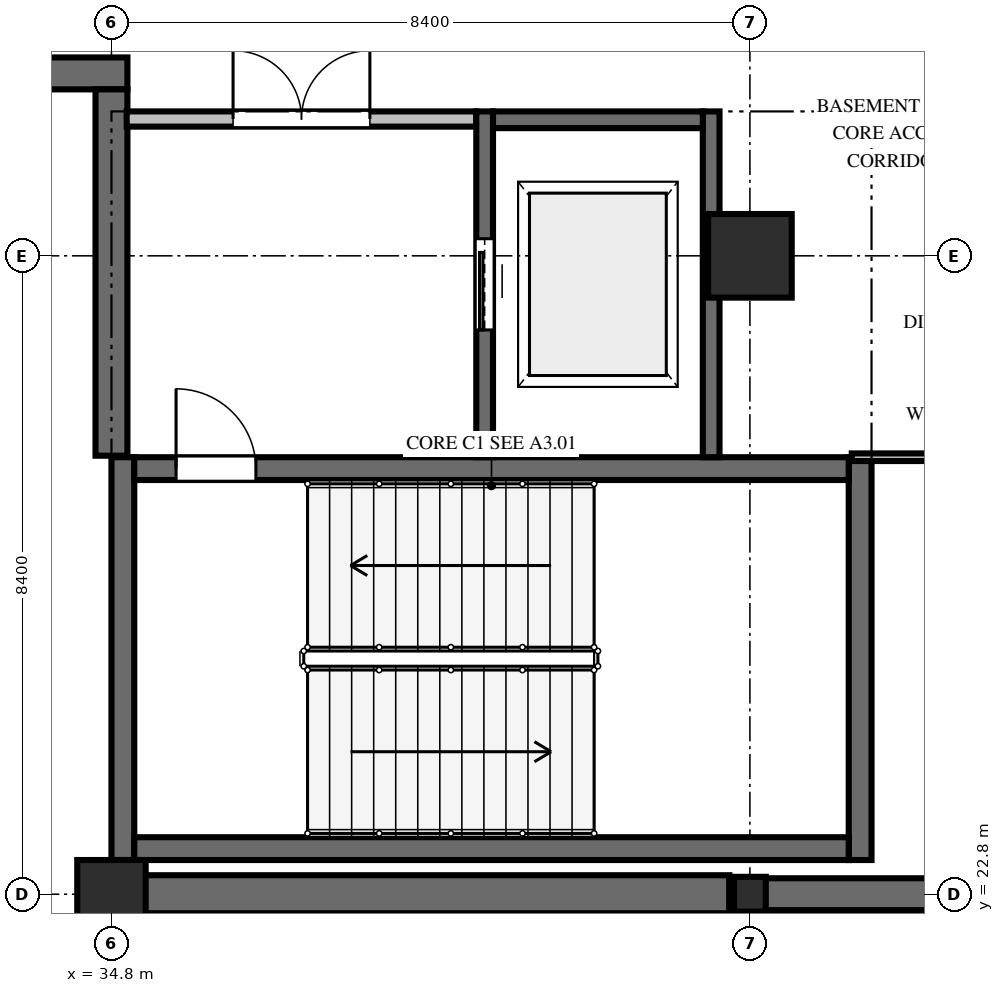
"""IFC4 building model, lengths in metres.
Left out: names, types, materials, properties, quantities, classifications, styles, units other than length and angle.
Written with IfcOpenShell. Run it as: python <this file> out.ifc"""

import sys

from ifc_helpers import new_model, si_unit, direction, frame, frame_2d, origin, origin_2d, place, context, subcontext, project, spatial, rectangle, hollow_rectangle, i_section, extrude, element, fill, save


model = new_model("IFC4")
c1 = context("Model", 3, precision=1e-05, world=origin(), true_north=direction((0.0, 1.0)))
c2 = subcontext(c1, "Body", "Model", "MODEL_VIEW")
j1 = project(units=[si_unit("LENGTHUNIT", "METRE"), si_unit("PLANEANGLEUNIT", "RADIAN")], contexts=[c1])
p1 = place(None, origin())
s1 = spatial("IfcSite", under=j1, at=p1, CompositionType="ELEMENT")
p2 = place(p1, origin())
s2 = spatial("IfcBuilding", under=s1, at=p2, CompositionType="ELEMENT")
p3 = place(p2, frame((0.0, 0.0, -4.8)))
s3 = spatial("IfcBuildingStorey", under=s2, at=p3, CompositionType="ELEMENT", Elevation=-4.8)
p4 = place(p3, frame((34.8, 22.8, 0.0), z_axis=(0.0, 0.0, 1.0), x_axis=(1.0, 0.0, 0.0)))
e1 = element("IfcColumn", 1, at=p4, inside=s3, PredefinedType="COLUMN", context=c2, shape_type="SweptSolid", body=[
    extrude(hollow_rectangle(XDim=0.9, YDim=0.9, WallThickness=0.036, InnerFilletRadius=0.036, OuterFilletRadius=0.072, at=origin_2d()), origin(), (0.0, 0.0, 1.0), 4.8),
])
p5 = place(p3, frame((43.2, 22.8, 0.0), z_axis=(0.0, 0.0, 1.0), x_axis=(1.0, 0.0, 0.0)))
e2 = element("IfcColumn", 2, at=p5, inside=s3, PredefinedType="COLUMN", context=c2, shape_type="SweptSolid", body=[
    extrude(i_section(OverallWidth=0.417, OverallDepth=0.458, WebThickness=0.03, FlangeThickness=0.04, FilletRadius=0.022, at=origin_2d()), origin(), (0.0, 0.0, 1.0), 4.8),
])
p6 = place(p3, frame((43.2, 31.2, 0.0), z_axis=(0.0, 0.0, 1.0), x_axis=(1.0, 0.0, 0.0)))
e3 = element("IfcColumn", 3, at=p6, inside=s3, PredefinedType="COLUMN", context=c2, shape_type="SweptSolid", body=[
    extrude(rectangle(XDim=1.1, YDim=1.1, at=origin_2d()), origin(), (0.0, 0.0, 1.0), 4.8),
])
p7 = place(p3, frame((24.3, 33.6, 0.0), z_axis=(0.0, 0.0, 1.0), x_axis=(1.0, 0.0, 0.0)))
e4 = element("IfcWall", 4, at=p7, inside=s3, PredefinedType="USERDEFINED", context=c2, shape_type="SweptSolid", body=[
    extrude(rectangle(XDim=10.71, YDim=0.42, at=frame_2d((5.355, 0.0))), origin(), (0.0, 0.0, 1.0), 4.32),
])
p8 = place(p3, frame((34.8, 33.39, 0.0), z_axis=(0.0, 0.0, 1.0), x_axis=(0.0, -1.0, 0.0)))
e5 = element("IfcWall", 5, at=p8, inside=s3, PredefinedType="USERDEFINED", context=c2, shape_type="SweptSolid", body=[
    extrude(rectangle(XDim=4.82, YDim=0.42, at=frame_2d((2.41, 0.0))), origin(), (0.0, 0.0, 1.0), 4.32),
])
p9 = place(p3, frame((34.55, 22.8, 0.0), z_axis=(0.0, 0.0, 1.0), x_axis=(1.0, 0.0, 0.0)))
e6 = element("IfcWall", 6, at=p9, inside=s3, PredefinedType="USERDEFINED", context=c2, shape_type="SweptSolid", body=[
    extrude(rectangle(XDim=8.38, YDim=0.5, at=frame_2d((4.19, 0.0))), origin(), (0.0, 0.0, 1.0), 4.32),
])
p10 = place(p3, frame((42.93, 22.8, 0.0), z_axis=(0.0, 0.0, 1.0), x_axis=(1.0, 0.0, 0.0)))
e7 = element("IfcWall", 7, at=p10, inside=s3, PredefinedType="USERDEFINED", context=c2, shape_type="SweptSolid", body=[
    extrude(rectangle(XDim=8.13, YDim=0.42, at=frame_2d((4.065, 0.0))), origin(), (0.0, 0.0, 1.0), 4.32),
])
for number, where, z_axis, x_axis in (
    (8, (34.95, 23.25, 0.0), (0.0, 0.0, 1.0), (0.0, 1.0, 0.0)),
    (9, (44.65, 28.55, 0.0), (0.0, 0.0, 1.0), (0.0, -1.0, 0.0)),
):
    element("IfcWall", number, at=place(p3, frame(where, z_axis=z_axis, x_axis=x_axis)), inside=s3, PredefinedType="SHEAR", context=c2, shape_type="SweptSolid", body=[
        extrude(rectangle(XDim=5.3, YDim=0.3, at=frame_2d((2.65, 0.0))), origin(), (0.0, 0.0, 1.0), 4.51),
    ])
p11 = place(p3, frame((44.5, 23.4, 0.0), z_axis=(0.0, 0.0, 1.0), x_axis=(-1.0, 0.0, 0.0)))
e10 = element("IfcWall", 10, at=p11, inside=s3, PredefinedType="SHEAR", context=c2, shape_type="SweptSolid", body=[
    extrude(rectangle(XDim=9.4, YDim=0.3, at=frame_2d((4.7, 0.0))), origin(), (0.0, 0.0, 1.0), 4.51),
])
p12 = place(p3, frame((35.1, 28.4, 0.0), z_axis=(0.0, 0.0, 1.0), x_axis=(1.0, 0.0, 0.0)))
e11 = element("IfcWall", 11, at=p12, inside=s3, PredefinedType="SHEAR", context=c2, shape_type="SweptSolid", body=[
    extrude(rectangle(XDim=9.4, YDim=0.3, at=frame_2d((4.7, 0.0))), origin(), (0.0, 0.0, 1.0), 4.51),
])
p13 = place(p12, frame((0.55, 0.0, 0.0)))
e12 = element("IfcOpeningElement", 12, at=p13, cuts=e11, PredefinedType="OPENING", context=c2, shape_type="SweptSolid", body=[
    extrude(rectangle(XDim=1.05, YDim=2.2, at=frame_2d((0.525, 1.1))), frame((0.0, 0.16, 0.0), z_axis=(0.0, -1.0, 0.0), x_axis=(1.0, 0.0, 0.0)), (0.0, 0.0, 1.0), 0.32),
])
p14 = place(p3, frame((35.0, 33.0, 0.0), z_axis=(0.0, 0.0, 1.0), x_axis=(1.0, 0.0, 0.0)))
e13 = element("IfcWall", 13, at=p14, inside=s3, PredefinedType="SOLIDWALL", context=c2, shape_type="SweptSolid", body=[
    extrude(rectangle(XDim=4.6, YDim=0.2, at=frame_2d((2.3, 0.0))), origin(), (0.0, 0.0, 1.0), 4.45),
])
p15 = place(p14, frame((1.4, 0.0, 0.0)))
e14 = element("IfcOpeningElement", 14, at=p15, cuts=e13, PredefinedType="OPENING", context=c2, shape_type="SweptSolid", body=[
    extrude(rectangle(XDim=1.8, YDim=2.2, at=frame_2d((0.9, 1.1))), frame((0.0, 0.11, 0.0), z_axis=(0.0, -1.0, 0.0), x_axis=(1.0, 0.0, 0.0)), (0.0, 0.0, 1.0), 0.22),
])
p16 = place(p3, frame((39.71, 28.55, 0.0), z_axis=(0.0, 0.0, 1.0), x_axis=(0.0, 1.0, 0.0)))
e15 = element("IfcWall", 15, at=p16, inside=s3, PredefinedType="SOLIDWALL", context=c2, shape_type="SweptSolid", body=[
    extrude(rectangle(XDim=4.55, YDim=0.22, at=frame_2d((2.275, 0.0))), origin(), (0.0, 0.0, 1.0), 4.51),
])
p17 = place(p16, frame((1.675, 0.0, 0.0)))
e16 = element("IfcOpeningElement", 16, at=p17, cuts=e15, PredefinedType="OPENING", context=c2, shape_type="SweptSolid", body=[
    extrude(rectangle(XDim=1.2, YDim=2.2, at=frame_2d((0.6, 1.1))), frame((0.0, 0.12, 0.0), z_axis=(0.0, -1.0, 0.0), x_axis=(1.0, 0.0, 0.0)), (0.0, 0.0, 1.0), 0.24),
])
p18 = place(p3, frame((42.69, 28.55, 0.0), z_axis=(0.0, 0.0, 1.0), x_axis=(0.0, 1.0, 0.0)))
e17 = element("IfcWall", 17, at=p18, inside=s3, PredefinedType="SOLIDWALL", context=c2, shape_type="SweptSolid", body=[
    extrude(rectangle(XDim=4.55, YDim=0.22, at=frame_2d((2.275, 0.0))), origin(), (0.0, 0.0, 1.0), 4.51),
])
p19 = place(p3, frame((39.82, 32.99, 0.0), z_axis=(0.0, 0.0, 1.0), x_axis=(1.0, 0.0, 0.0)))
e18 = element("IfcWall", 18, at=p19, inside=s3, PredefinedType="SOLIDWALL", context=c2, shape_type="SweptSolid", body=[
    extrude(rectangle(XDim=2.76, YDim=0.22, at=frame_2d((1.38, 0.0))), origin(), (0.0, 0.0, 1.0), 4.51),
])
p20 = place(p3, frame((46.68, 28.55, 0.0), z_axis=(0.0, 0.0, 1.0), x_axis=(-1.0, 0.0, 0.0)))
e19 = element("IfcWall", 19, at=p20, inside=s3, PredefinedType="PARTITIONING", context=c2, shape_type="SweptSolid", body=[
    extrude(rectangle(XDim=2.14, YDim=0.1, at=frame_2d((1.07, 0.0))), origin(), (0.0, 0.0, 1.0), 4.45),
])
p21 = place(p13, origin())
e20 = element("IfcDoor", 20, at=p21, inside=s3, OperationType="SINGLE_SWING_LEFT", PredefinedType="DOOR", context=c2, shape_type="SweptSolid", body=[
    extrude(rectangle(XDim=1.05, YDim=2.2, at=frame_2d((0.525, 1.1))), frame((0.0, 0.025, 0.0), z_axis=(0.0, -1.0, 0.0), x_axis=(1.0, 0.0, 0.0)), (0.0, 0.0, 1.0), 0.05),
])
fill(e12, e20)
p22 = place(p15, origin())
e21 = element("IfcDoor", 21, at=p22, inside=s3, OperationType="DOUBLE_DOOR_SINGLE_SWING", PredefinedType="DOOR", context=c2, shape_type="SweptSolid", body=[
    extrude(rectangle(XDim=1.8, YDim=2.2, at=frame_2d((0.9, 1.1))), frame((0.0, 0.025, 0.0), z_axis=(0.0, -1.0, 0.0), x_axis=(1.0, 0.0, 0.0)), (0.0, 0.0, 1.0), 0.05),
])
fill(e14, e21)
p23 = place(p17, origin())
e22 = element("IfcDoor", 22, at=p23, inside=s3, OperationType="SLIDING_TO_LEFT", PredefinedType="DOOR", context=c2, shape_type="SweptSolid", body=[
    extrude(rectangle(XDim=1.2, YDim=2.2, at=frame_2d((0.6, 1.1))), frame((0.0, 0.025, 0.0), z_axis=(0.0, -1.0, 0.0), x_axis=(1.0, 0.0, 0.0)), (0.0, 0.0, 1.0), 0.05),
])
fill(e16, e22)
save(model, sys.argv[1])
